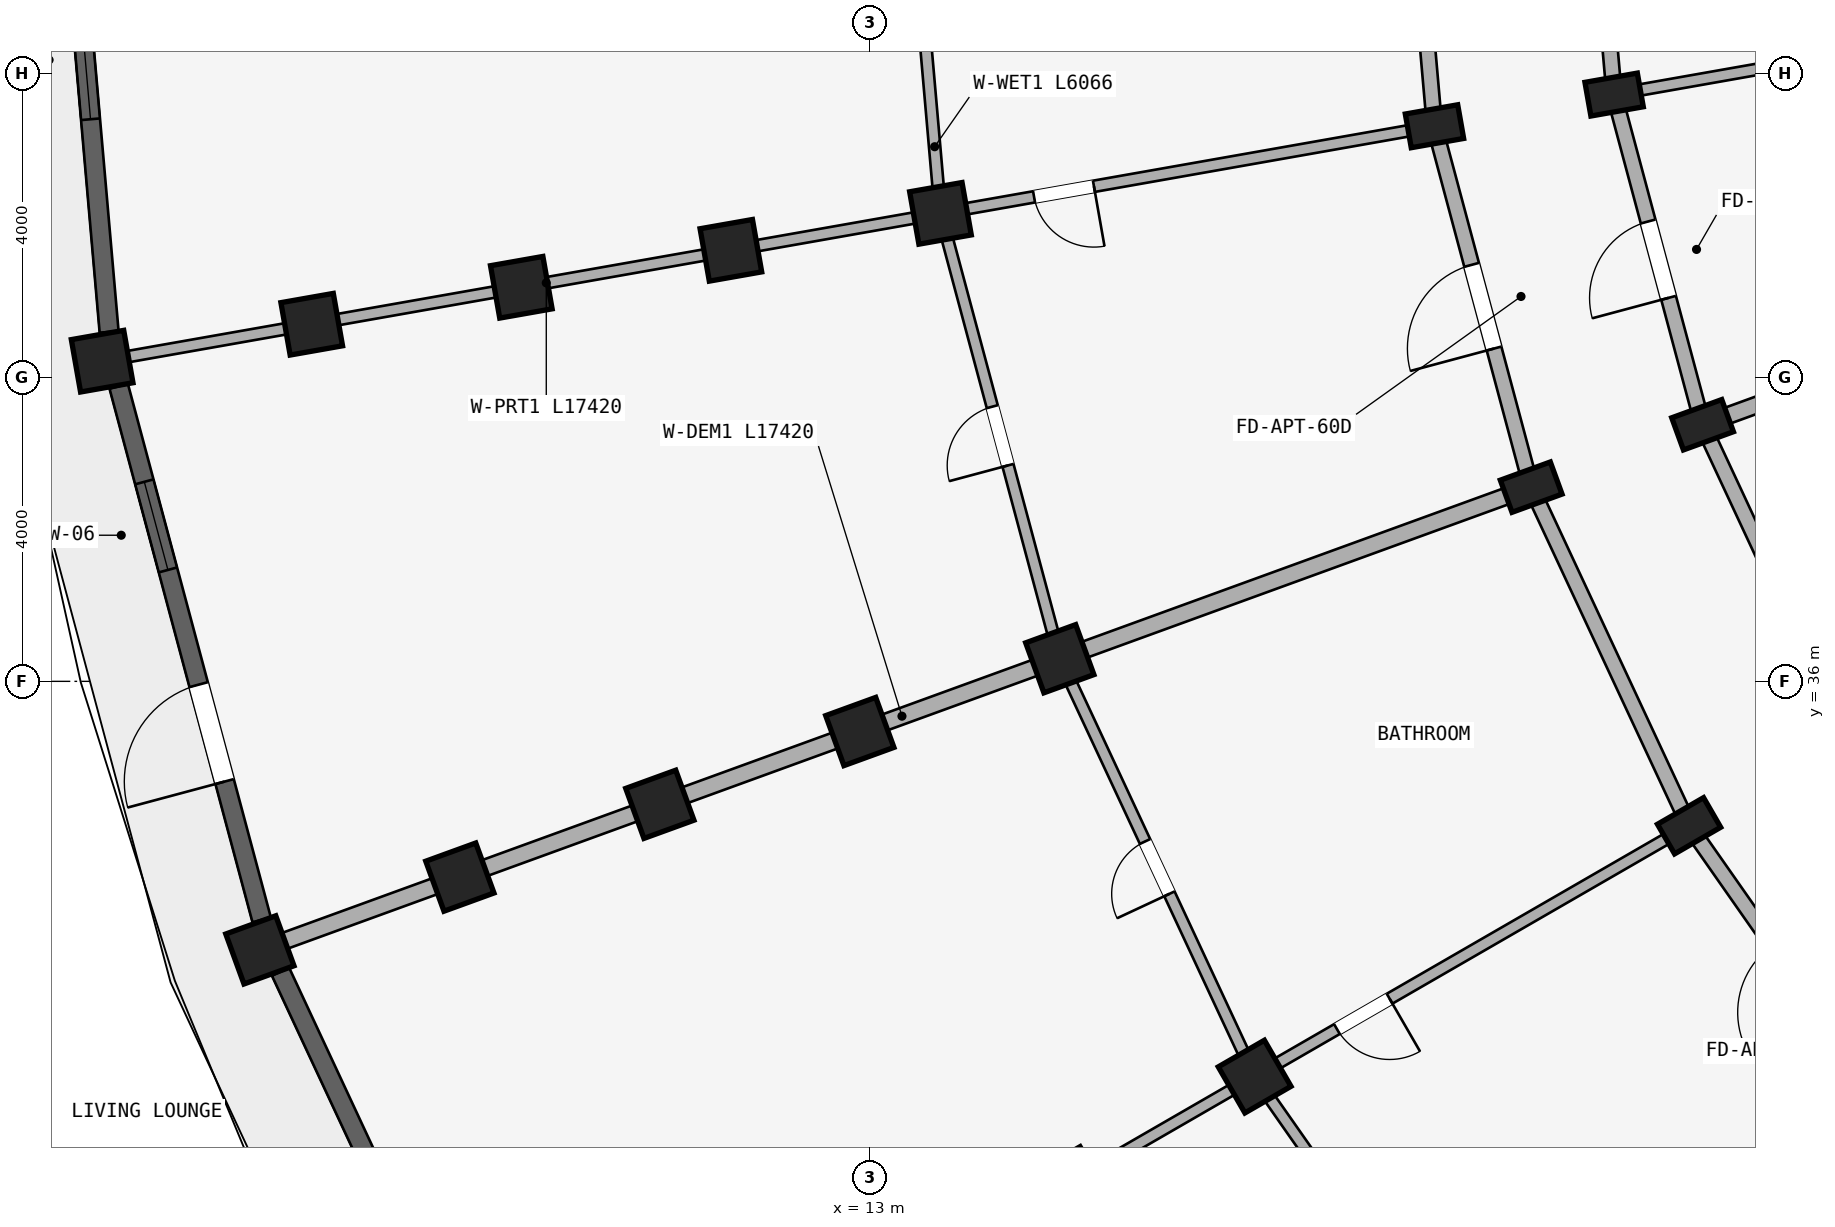
"""IFC4 building model, lengths in metres.
Left out: names, types, materials, properties, quantities, classifications, styles, units other than length and angle.
Written with IfcOpenShell. Run it as: python <this file> out.ifc"""

import sys

from ifc_helpers import new_model, si_unit, direction, frame, frame_2d, origin, origin_2d, place, context, subcontext, project, spatial, rectangle, extrude, element, fill, save


model = new_model("IFC4")
c1 = context("Model", 3, precision=1e-05, world=origin(), true_north=direction((0.0, 1.0)))
c2 = subcontext(c1, "Body", "Model", "MODEL_VIEW")
j1 = project(units=[si_unit("LENGTHUNIT", "METRE"), si_unit("PLANEANGLEUNIT", "RADIAN")], contexts=[c1])
p1 = place(None, origin())
s1 = spatial("IfcSite", under=j1, at=p1, CompositionType="ELEMENT")
p2 = place(p1, origin())
s2 = spatial("IfcBuilding", under=s1, at=p2, CompositionType="ELEMENT")
p3 = place(p2, frame((0.0, 0.0, 18.15)))
s3 = spatial("IfcBuildingStorey", under=s2, at=p3, CompositionType="ELEMENT", Elevation=18.15)
p4 = place(p3, frame((23.778, 34.1, 0.0), z_axis=(0.0, 0.0, 1.0), x_axis=(-0.5, 0.866025403784, 0.0)))
e1 = element("IfcColumn", 1, at=p4, inside=s3, PredefinedType="COLUMN", context=c2, shape_type="SweptSolid", body=[
    extrude(rectangle(XDim=0.45, YDim=0.7, at=origin_2d()), origin(), (0.0, 0.0, 1.0), 2.93),
])
for number, where, z_axis, x_axis in (
    (2, (18.062, 30.8, 0.0), (0.0, 0.0, 1.0), (-0.5, 0.866, 0.0)),
    (3, (15.637, 29.4, 0.0), (0.0, 0.0, 1.0), (-0.5, 0.866, 0.0)),
):
    element("IfcColumn", number, at=place(p3, frame(where, z_axis=z_axis, x_axis=x_axis)), inside=s3, PredefinedType="COLUMN", context=c2, shape_type="SweptSolid", body=[
        extrude(rectangle(XDim=0.7, YDim=0.7, at=origin_2d()), origin(), (0.0, 0.0, 1.0), 2.93),
    ])
for number, where, z_axis, x_axis in (
    (4, (23.956, 39.376, 0.0), (0.0, 0.0, 1.0), (-0.342, 0.94, 0.0)),
    (5, (21.701, 38.555, 0.0), (0.0, 0.0, 1.0), (-0.342, 0.94, 0.0)),
):
    element("IfcColumn", number, at=place(p3, frame(where, z_axis=z_axis, x_axis=x_axis)), inside=s3, PredefinedType="COLUMN", context=c2, shape_type="SweptSolid", body=[
        extrude(rectangle(XDim=0.45, YDim=0.7, at=origin_2d()), origin(), (0.0, 0.0, 1.0), 2.93),
    ])
for number, where, z_axis, x_axis in (
    (6, (15.499, 36.298, 0.0), (0.0, 0.0, 1.0), (-0.342, 0.94, 0.0)),
    (7, (12.868, 35.34, 0.0), (0.0, 0.0, 1.0), (-0.342, 0.94, 0.0)),
    (8, (10.236, 34.382, 0.0), (0.0, 0.0, 1.0), (-0.342, 0.94, 0.0)),
    (9, (7.605, 33.425, 0.0), (0.0, 0.0, 1.0), (-0.342, 0.94, 0.0)),
):
    element("IfcColumn", number, at=place(p3, frame(where, z_axis=z_axis, x_axis=x_axis)), inside=s3, PredefinedType="COLUMN", context=c2, shape_type="SweptSolid", body=[
        extrude(rectangle(XDim=0.7, YDim=0.7, at=origin_2d()), origin(), (0.0, 0.0, 1.0), 2.93),
    ])
p5 = place(p3, frame((4.974, 32.467, 0.0), z_axis=(0.0, 0.0, 1.0), x_axis=(-0.342020143326, 0.939692620786, 0.0)))
e10 = element("IfcColumn", 10, at=p5, inside=s3, PredefinedType="COLUMN", context=c2, shape_type="SweptSolid", body=[
    extrude(rectangle(XDim=0.7, YDim=0.7, at=origin_2d()), origin(), (0.0, 0.0, 1.0), 2.97),
])
for number, where, z_axis, x_axis in (
    (11, (22.792, 43.72, 0.0), (0.0, 0.0, 1.0), (-0.174, 0.985, 0.0)),
    (12, (20.428, 43.303, 0.0), (0.0, 0.0, 1.0), (-0.174, 0.985, 0.0)),
):
    element("IfcColumn", number, at=place(p3, frame(where, z_axis=z_axis, x_axis=x_axis)), inside=s3, PredefinedType="COLUMN", context=c2, shape_type="SweptSolid", body=[
        extrude(rectangle(XDim=0.45, YDim=0.7, at=origin_2d()), origin(), (0.0, 0.0, 1.0), 2.93),
    ])
for number, where, z_axis, x_axis in (
    (13, (13.929, 42.157, 0.0), (0.0, 0.0, 1.0), (-0.174, 0.985, 0.0)),
    (14, (11.171, 41.671, 0.0), (0.0, 0.0, 1.0), (-0.174, 0.985, 0.0)),
    (15, (8.414, 41.185, 0.0), (0.0, 0.0, 1.0), (-0.174, 0.985, 0.0)),
    (16, (5.656, 40.698, 0.0), (0.0, 0.0, 1.0), (-0.174, 0.985, 0.0)),
):
    element("IfcColumn", number, at=place(p3, frame(where, z_axis=z_axis, x_axis=x_axis)), inside=s3, PredefinedType="COLUMN", context=c2, shape_type="SweptSolid", body=[
        extrude(rectangle(XDim=0.7, YDim=0.7, at=origin_2d()), origin(), (0.0, 0.0, 1.0), 2.93),
    ])
p6 = place(p3, frame((2.899, 40.212, 0.0), z_axis=(0.0, 0.0, 1.0), x_axis=(-0.173648177667, 0.984807753012, 0.0)))
e17 = element("IfcColumn", 17, at=p6, inside=s3, PredefinedType="COLUMN", context=c2, shape_type="SweptSolid", body=[
    extrude(rectangle(XDim=0.7, YDim=0.7, at=origin_2d()), origin(), (0.0, 0.0, 1.0), 2.97),
])
p7 = place(p3, frame((26.598, 30.073, 0.0), z_axis=(0.0, 0.0, 1.0), x_axis=(-0.573592335331, 0.819140911474, 0.0)))
e18 = element("IfcWall", 18, at=p7, inside=s3, PredefinedType="STANDARD", context=c2, shape_type="SweptSolid", body=[
    extrude(rectangle(XDim=4.916, YDim=0.2, at=frame_2d((2.458, 0.0))), origin(), (0.0, 0.0, 1.0), 2.372),
])
p8 = place(p7, frame((1.918, 0.0, 0.0)))
e19 = element("IfcOpeningElement", 19, at=p8, cuts=e18, PredefinedType="OPENING", context=c2, shape_type="SweptSolid", body=[
    extrude(rectangle(XDim=1.08, YDim=2.15, at=frame_2d((0.54, 1.075))), frame((0.0, 0.11, 0.0), z_axis=(0.0, -1.0, 0.0), x_axis=(1.0, 0.0, 0.0)), (0.0, 0.0, 1.0), 0.22),
])
p9 = place(p3, frame((25.856, 35.3, 0.0), z_axis=(0.0, 0.0, 1.0), x_axis=(-0.422617978463, 0.906307919131, 0.0)))
e20 = element("IfcWall", 20, at=p9, inside=s3, PredefinedType="STANDARD", context=c2, shape_type="SweptSolid", body=[
    extrude(rectangle(XDim=4.497, YDim=0.2, at=frame_2d((2.249, 0.0))), origin(), (0.0, 0.0, 1.0), 2.372),
])
p10 = place(p3, frame((23.778, 34.1, 0.0), z_axis=(0.0, 0.0, 1.0), x_axis=(-0.422629854778, 0.906302381024, 0.0)))
e21 = element("IfcWall", 21, at=p10, inside=s3, PredefinedType="STANDARD", context=c2, shape_type="SweptSolid", body=[
    extrude(rectangle(XDim=4.915, YDim=0.2, at=frame_2d((2.458, 0.0))), origin(), (0.0, 0.0, 1.0), 2.372),
])
p11 = place(p3, frame((23.956, 39.376, 0.0), z_axis=(0.0, 0.0, 1.0), x_axis=(-0.258787642463, 0.965934240054, 0.0)))
e22 = element("IfcWall", 22, at=p11, inside=s3, PredefinedType="STANDARD", context=c2, shape_type="SweptSolid", body=[
    extrude(rectangle(XDim=4.497, YDim=0.2, at=frame_2d((2.249, 0.0))), origin(), (0.0, 0.0, 1.0), 2.372),
])
p12 = place(p11, frame((1.729, 0.0, 0.0)))
e23 = element("IfcOpeningElement", 23, at=p12, cuts=e22, PredefinedType="OPENING", context=c2, shape_type="SweptSolid", body=[
    extrude(rectangle(XDim=1.04, YDim=2.15, at=frame_2d((0.52, 1.075))), frame((0.0, 0.11, 0.0), z_axis=(0.0, -1.0, 0.0), x_axis=(1.0, 0.0, 0.0)), (0.0, 0.0, 1.0), 0.22),
])
p13 = place(p3, frame((21.701, 38.555, 0.0), z_axis=(0.0, 0.0, 1.0), x_axis=(-0.258803112091, 0.965930095386, 0.0)))
e24 = element("IfcWall", 24, at=p13, inside=s3, PredefinedType="STANDARD", context=c2, shape_type="SweptSolid", body=[
    extrude(rectangle(XDim=4.916, YDim=0.2, at=frame_2d((2.458, 0.0))), origin(), (0.0, 0.0, 1.0), 2.372),
])
p14 = place(p13, frame((1.888, 0.0, 0.0)))
e25 = element("IfcOpeningElement", 25, at=p14, cuts=e24, PredefinedType="OPENING", context=c2, shape_type="SweptSolid", body=[
    extrude(rectangle(XDim=1.14, YDim=2.15, at=frame_2d((0.57, 1.075))), frame((0.0, 0.11, 0.0), z_axis=(0.0, -1.0, 0.0), x_axis=(1.0, 0.0, 0.0)), (0.0, 0.0, 1.0), 0.22),
])
p15 = place(p3, frame((22.792, 43.72, 0.0), z_axis=(0.0, 0.0, 1.0), x_axis=(-0.087187153726, 0.996191949488, 0.0)))
e26 = element("IfcWall", 26, at=p15, inside=s3, PredefinedType="STANDARD", context=c2, shape_type="SweptSolid", body=[
    extrude(rectangle(XDim=4.497, YDim=0.2, at=frame_2d((2.249, 0.0))), origin(), (0.0, 0.0, 1.0), 2.372),
])
p16 = place(p3, frame((20.428, 43.303, 0.0), z_axis=(0.0, 0.0, 1.0), x_axis=(-0.087167566415, 0.996193663584, 0.0)))
e27 = element("IfcWall", 27, at=p16, inside=s3, PredefinedType="STANDARD", context=c2, shape_type="SweptSolid", body=[
    extrude(rectangle(XDim=4.916, YDim=0.2, at=frame_2d((2.458, 0.0))), origin(), (0.0, 0.0, 1.0), 2.372),
])
p17 = place(p3, frame((26.521, 30.009, 0.0), z_axis=(0.0, 0.0, 1.0), x_axis=(-0.766046835987, -0.642784757967, 0.0)))
e28 = element("IfcWall", 28, at=p17, inside=s3, PredefinedType="STANDARD", context=c2, shape_type="SweptSolid", body=[
    extrude(rectangle(XDim=17.42, YDim=0.22, at=frame_2d((8.71, 0.0))), origin(), (0.0, 0.0, 1.0), 2.372),
])
p18 = place(p3, frame((23.691, 34.05, 0.0), z_axis=(0.0, 0.0, 1.0), x_axis=(-0.866026648973, -0.499997843263, 0.0)))
e29 = element("IfcWall", 29, at=p18, inside=s3, PredefinedType="PARTITIONING", context=c2, shape_type="SweptSolid", body=[
    extrude(rectangle(XDim=17.42, YDim=0.15, at=frame_2d((8.71, 0.0))), origin(), (0.0, 0.0, 1.0), 2.372),
])
p19 = place(p18, frame((4.45, 0.0, 0.0)))
e30 = element("IfcOpeningElement", 30, at=p19, cuts=e29, PredefinedType="OPENING", context=c2, shape_type="SweptSolid", body=[
    extrude(rectangle(XDim=0.8, YDim=2.1, at=frame_2d((0.4, 1.05))), frame((0.0, 0.085, 0.0), z_axis=(0.0, -1.0, 0.0), x_axis=(1.0, 0.0, 0.0)), (0.0, 0.0, 1.0), 0.17),
])
p20 = place(p3, frame((30.346, 41.702, 0.0), z_axis=(0.0, 0.0, 1.0), x_axis=(-0.939696231917, -0.342010221662, 0.0)))
e31 = element("IfcWall", 31, at=p20, inside=s3, PredefinedType="STANDARD", context=c2, shape_type="SweptSolid", body=[
    extrude(rectangle(XDim=6.75, YDim=0.22, at=frame_2d((3.375, 0.0))), origin(), (0.0, 0.0, 1.0), 2.372),
])
p21 = place(p3, frame((21.607, 38.521, 0.0), z_axis=(0.0, 0.0, 1.0), x_axis=(-0.939691901159, -0.342022120477, 0.0)))
e32 = element("IfcWall", 32, at=p21, inside=s3, PredefinedType="STANDARD", context=c2, shape_type="SweptSolid", body=[
    extrude(rectangle(XDim=17.42, YDim=0.22, at=frame_2d((8.71, 0.0))), origin(), (0.0, 0.0, 1.0), 2.372),
])
p22 = place(p3, frame((29.489, 44.901, 0.0), z_axis=(0.0, 0.0, 1.0), x_axis=(-0.984807944945, -0.173647089161, 0.0)))
e33 = element("IfcWall", 33, at=p22, inside=s3, PredefinedType="PARTITIONING", context=c2, shape_type="SweptSolid", body=[
    extrude(rectangle(XDim=6.75, YDim=0.15, at=frame_2d((3.375, 0.0))), origin(), (0.0, 0.0, 1.0), 2.372),
])
p23 = place(p22, frame((3.222, 0.0, 0.0)))
e34 = element("IfcOpeningElement", 34, at=p23, cuts=e33, PredefinedType="OPENING", context=c2, shape_type="SweptSolid", body=[
    extrude(rectangle(XDim=0.98, YDim=2.12, at=frame_2d((0.49, 1.06))), frame((0.0, 0.085, 0.0), z_axis=(0.0, -1.0, 0.0), x_axis=(1.0, 0.0, 0.0)), (0.0, 0.0, 1.0), 0.17),
])
p24 = place(p3, frame((20.33, 43.286, 0.0), z_axis=(0.0, 0.0, 1.0), x_axis=(-0.984808098809, -0.173646216546, 0.0)))
e35 = element("IfcWall", 35, at=p24, inside=s3, PredefinedType="PARTITIONING", context=c2, shape_type="SweptSolid", body=[
    extrude(rectangle(XDim=17.42, YDim=0.15, at=frame_2d((8.71, 0.0))), origin(), (0.0, 0.0, 1.0), 2.372),
])
p25 = place(p24, frame((4.45, 0.0, 0.0)))
e36 = element("IfcOpeningElement", 36, at=p25, cuts=e35, PredefinedType="OPENING", context=c2, shape_type="SweptSolid", body=[
    extrude(rectangle(XDim=0.8, YDim=2.1, at=frame_2d((0.4, 1.05))), frame((0.0, 0.085, 0.0), z_axis=(0.0, -1.0, 0.0), x_axis=(1.0, 0.0, 0.0)), (0.0, 0.0, 1.0), 0.17),
])
p26 = place(p3, frame((21.542, 25.831, 0.0), z_axis=(0.0, 0.0, 1.0), x_axis=(-0.573594691504, 0.81913926159, 0.0)))
e37 = element("IfcWall", 37, at=p26, inside=s3, PredefinedType="PLUMBINGWALL", context=c2, shape_type="SweptSolid", body=[
    extrude(rectangle(XDim=6.066, YDim=0.15, at=frame_2d((3.033, 0.0))), origin(), (0.0, 0.0, 1.0), 2.372),
])
p27 = place(p26, frame((2.613, 0.0, 0.0)))
e38 = element("IfcOpeningElement", 38, at=p27, cuts=e37, PredefinedType="OPENING", context=c2, shape_type="SweptSolid", body=[
    extrude(rectangle(XDim=0.84, YDim=2.1, at=frame_2d((0.42, 1.05))), frame((0.0, 0.085, 0.0), z_axis=(0.0, -1.0, 0.0), x_axis=(1.0, 0.0, 0.0)), (0.0, 0.0, 1.0), 0.17),
])
p28 = place(p3, frame((18.062, 30.8, 0.0), z_axis=(0.0, 0.0, 1.0), x_axis=(-0.42260781991, 0.906312656069, 0.0)))
e39 = element("IfcWall", 39, at=p28, inside=s3, PredefinedType="PLUMBINGWALL", context=c2, shape_type="SweptSolid", body=[
    extrude(rectangle(XDim=6.066, YDim=0.15, at=frame_2d((3.033, 0.0))), origin(), (0.0, 0.0, 1.0), 2.372),
])
p29 = place(p28, frame((2.653, 0.0, 0.0)))
e40 = element("IfcOpeningElement", 40, at=p29, cuts=e39, PredefinedType="OPENING", context=c2, shape_type="SweptSolid", body=[
    extrude(rectangle(XDim=0.76, YDim=2.05, at=frame_2d((0.38, 1.025))), frame((0.0, 0.085, 0.0), z_axis=(0.0, -1.0, 0.0), x_axis=(1.0, 0.0, 0.0)), (0.0, 0.0, 1.0), 0.17),
])
p30 = place(p3, frame((15.499, 36.298, 0.0), z_axis=(0.0, 0.0, 1.0), x_axis=(-0.258827283048, 0.965923618901, 0.0)))
e41 = element("IfcWall", 41, at=p30, inside=s3, PredefinedType="PLUMBINGWALL", context=c2, shape_type="SweptSolid", body=[
    extrude(rectangle(XDim=6.066, YDim=0.15, at=frame_2d((3.033, 0.0))), origin(), (0.0, 0.0, 1.0), 2.372),
])
p31 = place(p30, frame((2.633, 0.0, 0.0)))
e42 = element("IfcOpeningElement", 42, at=p31, cuts=e41, PredefinedType="OPENING", context=c2, shape_type="SweptSolid", body=[
    extrude(rectangle(XDim=0.8, YDim=2.1, at=frame_2d((0.4, 1.05))), frame((0.0, 0.085, 0.0), z_axis=(0.0, -1.0, 0.0), x_axis=(1.0, 0.0, 0.0)), (0.0, 0.0, 1.0), 0.17),
])
p32 = place(p3, frame((13.929, 42.157, 0.0), z_axis=(0.0, 0.0, 1.0), x_axis=(-0.087174938512, 0.996193018494, 0.0)))
e43 = element("IfcWall", 43, at=p32, inside=s3, PredefinedType="PLUMBINGWALL", context=c2, shape_type="SweptSolid", body=[
    extrude(rectangle(XDim=6.066, YDim=0.15, at=frame_2d((3.033, 0.0))), origin(), (0.0, 0.0, 1.0), 2.372),
])
p33 = place(p32, frame((2.613, 0.0, 0.0)))
e44 = element("IfcOpeningElement", 44, at=p33, cuts=e43, PredefinedType="OPENING", context=c2, shape_type="SweptSolid", body=[
    extrude(rectangle(XDim=0.84, YDim=2.1, at=frame_2d((0.42, 1.05))), frame((0.0, 0.085, 0.0), z_axis=(0.0, -1.0, 0.0), x_axis=(1.0, 0.0, 0.0)), (0.0, 0.0, 1.0), 0.17),
])
p34 = place(p3, frame((8.317, 25.594, 0.0), z_axis=(0.0, 0.0, 1.0), x_axis=(-0.422627946127, 0.90630327107, 0.0)))
e45 = element("IfcWall", 45, at=p34, inside=s3, PredefinedType="STANDARD", context=c2, shape_type="SweptSolid", body=[
    extrude(rectangle(XDim=7.267, YDim=0.25, at=frame_2d((3.633, 0.0))), origin(), (0.0, 0.0, 1.0), 2.412),
])
p35 = place(p34, frame((2.658, 0.0, 0.362)))
e46 = element("IfcOpeningElement", 46, at=p35, cuts=e45, PredefinedType="OPENING", context=c2, shape_type="SweptSolid", body=[
    extrude(rectangle(XDim=1.95, YDim=1.85, at=frame_2d((0.975, 0.925))), frame((0.0, 0.135, 0.0), z_axis=(0.0, -1.0, 0.0), x_axis=(1.0, 0.0, 0.0)), (0.0, 0.0, 1.0), 0.27),
])
p36 = place(p3, frame((4.998, 32.863, 0.0), z_axis=(0.0, 0.0, 1.0), x_axis=(-0.258802140196, 0.965930355787, 0.0)))
e47 = element("IfcWall", 47, at=p36, inside=s3, PredefinedType="STANDARD", context=c2, shape_type="SweptSolid", body=[
    extrude(rectangle(XDim=7.267, YDim=0.25, at=frame_2d((3.633, 0.0))), origin(), (0.0, 0.0, 1.0), 2.412),
])
p37 = place(p36, frame((4.766, 0.0, 0.562)))
e48 = element("IfcOpeningElement", 48, at=p37, cuts=e47, PredefinedType="OPENING", context=c2, shape_type="SweptSolid", body=[
    extrude(rectangle(XDim=1.2, YDim=1.5, at=frame_2d((0.6, 0.75))), frame((0.0, 0.135, 0.0), z_axis=(0.0, -1.0, 0.0), x_axis=(1.0, 0.0, 0.0)), (0.0, 0.0, 1.0), 0.27),
])
p38 = place(p36, frame((1.883, 0.0, 0.0)))
e49 = element("IfcOpeningElement", 49, at=p38, cuts=e47, PredefinedType="OPENING", context=c2, shape_type="SweptSolid", body=[
    extrude(rectangle(XDim=1.32, YDim=2.15, at=frame_2d((0.66, 1.075))), frame((0.0, 0.135, 0.0), z_axis=(0.0, -1.0, 0.0), x_axis=(1.0, 0.0, 0.0)), (0.0, 0.0, 1.0), 0.27),
])
p39 = place(p3, frame((2.991, 40.597, 0.0), z_axis=(0.0, 0.0, 1.0), x_axis=(-0.08718487158, 0.99619214922, 0.0)))
e50 = element("IfcWall", 50, at=p39, inside=s3, PredefinedType="STANDARD", context=c2, shape_type="SweptSolid", body=[
    extrude(rectangle(XDim=7.267, YDim=0.25, at=frame_2d((3.633, 0.0))), origin(), (0.0, 0.0, 1.0), 2.412),
])
p40 = place(p39, frame((2.808, 0.0, 0.462)))
e51 = element("IfcOpeningElement", 51, at=p40, cuts=e50, PredefinedType="OPENING", context=c2, shape_type="SweptSolid", body=[
    extrude(rectangle(XDim=1.65, YDim=1.75, at=frame_2d((0.825, 0.875))), frame((0.0, 0.135, 0.0), z_axis=(0.0, -1.0, 0.0), x_axis=(1.0, 0.0, 0.0)), (0.0, 0.0, 1.0), 0.27),
])
p41 = place(p37, origin())
e52 = element("IfcWindow", 52, at=p41, inside=s3, PartitioningType="SINGLE_PANEL", PredefinedType="WINDOW", context=c2, shape_type="SweptSolid", body=[
    extrude(rectangle(XDim=1.2, YDim=1.5, at=frame_2d((0.6, 0.75))), frame((0.0, 0.03, 0.0), z_axis=(0.0, -1.0, 0.0), x_axis=(1.0, 0.0, 0.0)), (0.0, 0.0, 1.0), 0.06),
])
fill(e48, e52)
p42 = place(p40, origin())
e53 = element("IfcWindow", 53, at=p42, inside=s3, PartitioningType="DOUBLE_PANEL_VERTICAL", PredefinedType="WINDOW", context=c2, shape_type="SweptSolid", body=[
    extrude(rectangle(XDim=1.65, YDim=1.75, at=frame_2d((0.825, 0.875))), frame((0.0, 0.03, 0.0), z_axis=(0.0, -1.0, 0.0), x_axis=(1.0, 0.0, 0.0)), (0.0, 0.0, 1.0), 0.06),
])
fill(e51, e53)
p43 = place(p19, frame((0.8, 0.0, 0.0), z_axis=(0.0, 0.0, 1.0), x_axis=(-1.0, 0.0, 0.0)))
e54 = element("IfcDoor", 54, at=p43, inside=s3, OperationType="SINGLE_SWING_RIGHT", PredefinedType="DOOR", context=c2, shape_type="SweptSolid", body=[
    extrude(rectangle(XDim=0.8, YDim=2.1, at=frame_2d((0.4, 1.05))), frame((0.0, 0.025, 0.0), z_axis=(0.0, -1.0, 0.0), x_axis=(1.0, 0.0, 0.0)), (0.0, 0.0, 1.0), 0.05),
])
fill(e30, e54)
p44 = place(p25, frame((0.8, 0.0, 0.0), z_axis=(0.0, 0.0, 1.0), x_axis=(-1.0, 0.0, 0.0)))
e55 = element("IfcDoor", 55, at=p44, inside=s3, OperationType="SINGLE_SWING_RIGHT", PredefinedType="DOOR", context=c2, shape_type="SweptSolid", body=[
    extrude(rectangle(XDim=0.8, YDim=2.1, at=frame_2d((0.4, 1.05))), frame((0.0, 0.025, 0.0), z_axis=(0.0, -1.0, 0.0), x_axis=(1.0, 0.0, 0.0)), (0.0, 0.0, 1.0), 0.05),
])
fill(e36, e55)
p45 = place(p29, frame((0.76, 0.0, 0.0), z_axis=(0.0, 0.0, 1.0), x_axis=(-1.0, 0.0, 0.0)))
e56 = element("IfcDoor", 56, at=p45, inside=s3, OperationType="SINGLE_SWING_RIGHT", PredefinedType="DOOR", context=c2, shape_type="SweptSolid", body=[
    extrude(rectangle(XDim=0.76, YDim=2.05, at=frame_2d((0.38, 1.025))), frame((0.0, 0.025, 0.0), z_axis=(0.0, -1.0, 0.0), x_axis=(1.0, 0.0, 0.0)), (0.0, 0.0, 1.0), 0.05),
])
fill(e40, e56)
p46 = place(p14, origin())
e57 = element("IfcDoor", 57, at=p46, inside=s3, OperationType="SINGLE_SWING_LEFT", PredefinedType="DOOR", context=c2, shape_type="SweptSolid", body=[
    extrude(rectangle(XDim=1.14, YDim=2.15, at=frame_2d((0.57, 1.075))), frame((0.0, 0.025, 0.0), z_axis=(0.0, -1.0, 0.0), x_axis=(1.0, 0.0, 0.0)), (0.0, 0.0, 1.0), 0.05),
])
fill(e25, e57)
p47 = place(p31, frame((0.8, 0.0, 0.0), z_axis=(0.0, 0.0, 1.0), x_axis=(-1.0, 0.0, 0.0)))
e58 = element("IfcDoor", 58, at=p47, inside=s3, OperationType="SINGLE_SWING_RIGHT", PredefinedType="DOOR", context=c2, shape_type="SweptSolid", body=[
    extrude(rectangle(XDim=0.8, YDim=2.1, at=frame_2d((0.4, 1.05))), frame((0.0, 0.025, 0.0), z_axis=(0.0, -1.0, 0.0), x_axis=(1.0, 0.0, 0.0)), (0.0, 0.0, 1.0), 0.05),
])
fill(e42, e58)
p48 = place(p12, origin())
e59 = element("IfcDoor", 59, at=p48, inside=s3, OperationType="SINGLE_SWING_LEFT", PredefinedType="DOOR", context=c2, shape_type="SweptSolid", body=[
    extrude(rectangle(XDim=1.04, YDim=2.15, at=frame_2d((0.52, 1.075))), frame((0.0, 0.025, 0.0), z_axis=(0.0, -1.0, 0.0), x_axis=(1.0, 0.0, 0.0)), (0.0, 0.0, 1.0), 0.05),
])
fill(e23, e59)
p49 = place(p38, origin())
e60 = element("IfcDoor", 60, at=p49, inside=s3, OperationType="SINGLE_SWING_LEFT", PredefinedType="DOOR", context=c2, shape_type="SweptSolid", body=[
    extrude(rectangle(XDim=1.32, YDim=2.15, at=frame_2d((0.66, 1.075))), frame((0.0, 0.025, 0.0), z_axis=(0.0, -1.0, 0.0), x_axis=(1.0, 0.0, 0.0)), (0.0, 0.0, 1.0), 0.05),
])
fill(e49, e60)
save(model, sys.argv[1])
